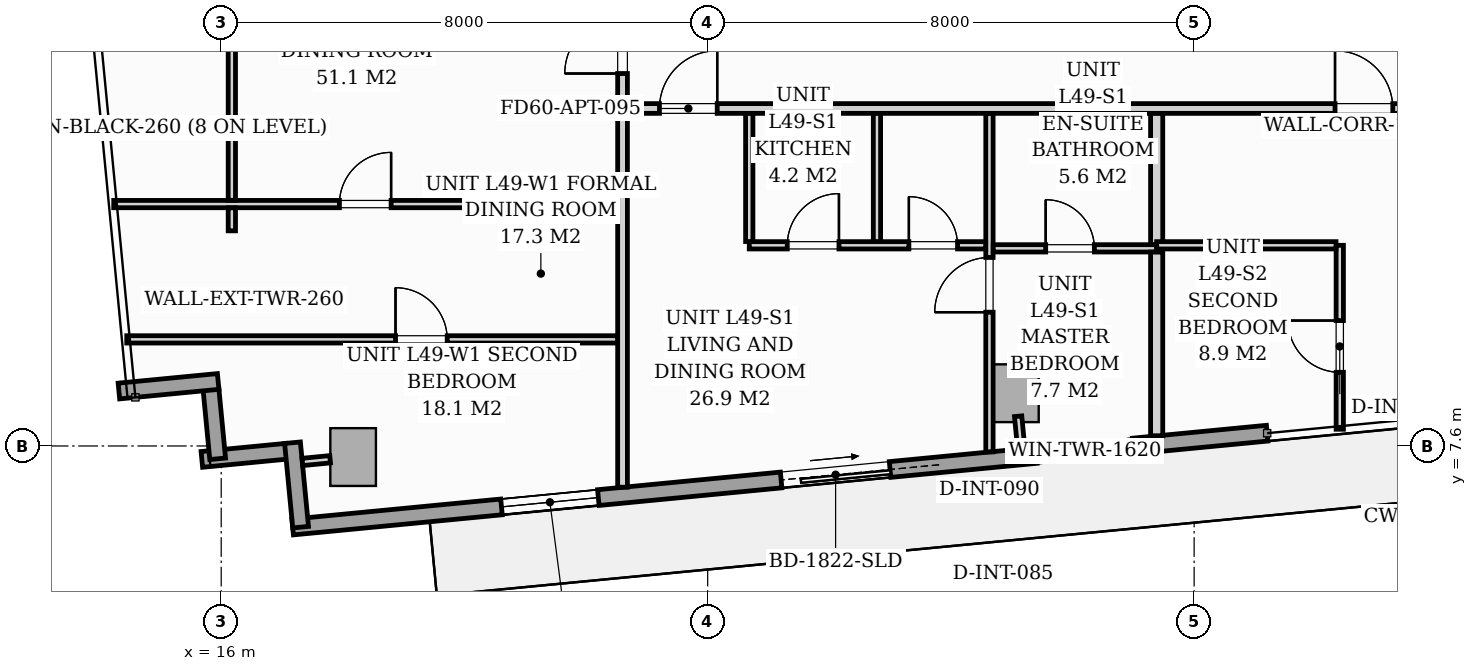
"""IFC4 building model, lengths in metres.
Left out: names, types, materials, properties, quantities, classifications, styles, units other than length and angle.
Written with IfcOpenShell. Run it as: python <this file> out.ifc"""

import sys

from ifc_helpers import new_model, si_unit, direction, frame, frame_2d, origin, origin_2d, place, context, subcontext, project, spatial, rectangle, extrude, source, transform, mapped, element, fill, save


model = new_model("IFC4")
c1 = context("Model", 3, precision=1e-05, world=origin(), true_north=direction((0.0, 1.0)))
c2 = subcontext(c1, "Body", "Model", "MODEL_VIEW")
j1 = project(units=[si_unit("LENGTHUNIT", "METRE"), si_unit("PLANEANGLEUNIT", "RADIAN")], contexts=[c1])
p1 = place(None, origin())
s1 = spatial("IfcSite", under=j1, at=p1, CompositionType="ELEMENT")
p2 = place(p1, origin())
s2 = spatial("IfcBuilding", under=s1, at=p2, CompositionType="ELEMENT")
p3 = place(p2, frame((0.0, 0.0, 173.0)))
s3 = spatial("IfcBuildingStorey", under=s2, at=p3, CompositionType="ELEMENT", Elevation=173.0)
m1 = source(origin(), c2, "Body", "SweptSolid", [
    extrude(rectangle(XDim=0.75, YDim=0.95, at=origin_2d()), origin(), (0.0, 0.0, 1.0), 3.196),
])
for number, where, z_axis, x_axis in (
    (1, (18.169, 7.418, 0.002), (0.0, 0.0, 1.0), (0.995, 0.096, 0.0)),
    (2, (29.069, 8.467, 0.002), (0.0, 0.0, 1.0), (0.995, 0.096, 0.0)),
):
    element("IfcColumn", number, at=place(p3, frame(where, z_axis=z_axis, x_axis=x_axis)), inside=s3, PredefinedType="COLUMN", context=c2, shape_type="MappedRepresentation", body=[
        mapped(m1, transform((0.0, 0.0, 0.0), scale=1.0)),
    ])
p4 = place(p3, frame((17.07, 7.513, 0.0), z_axis=(0.0, 0.0, 1.0), x_axis=(-0.995391056452, -0.09589913835, 0.0)))
e3 = element("IfcWall", 3, at=p4, inside=s3, PredefinedType="STANDARD", context=c2, shape_type="SweptSolid", body=[
    extrude(rectangle(XDim=1.395, YDim=0.26, at=frame_2d((0.698, 0.0))), origin(), (0.0, 0.0, 1.0), 2.94),
])
p5 = place(p3, frame((15.942, 7.389, 0.0), z_axis=(0.0, 0.0, 1.0), x_axis=(-0.09576095695, 0.995404359607, 0.0)))
e4 = element("IfcWall", 4, at=p5, inside=s3, PredefinedType="STANDARD", context=c2, shape_type="SweptSolid", body=[
    extrude(rectangle(XDim=1.15, YDim=0.26, at=frame_2d((0.575, 0.0))), origin(), (0.0, 0.0, 1.0), 2.94),
])
p6 = place(p3, frame((15.95, 8.661, 0.0), z_axis=(0.0, 0.0, 1.0), x_axis=(-0.995394563142, -0.095862733462, 0.0)))
e5 = element("IfcWall", 5, at=p6, inside=s3, PredefinedType="STANDARD", context=c2, shape_type="SweptSolid", body=[
    extrude(rectangle(XDim=1.64, YDim=0.26, at=frame_2d((0.82, 0.0))), origin(), (0.0, 0.0, 1.0), 2.94),
])
p7 = place(p3, frame((33.201, 7.81, 0.0), z_axis=(0.0, 0.0, 1.0), x_axis=(-0.995397074604, -0.095836652014, 0.0)))
e6 = element("IfcWall", 6, at=p7, inside=s3, PredefinedType="STANDARD", context=c2, shape_type="SweptSolid", body=[
    extrude(rectangle(XDim=16.1, YDim=0.26, at=frame_2d((8.05, 0.0))), origin(), (0.0, 0.0, 1.0), 2.94),
])
p8 = place(p7, frame((6.23, 0.0, 0.0)))
e7 = element("IfcOpeningElement", 7, at=p8, cuts=e6, PredefinedType="OPENING", context=c2, shape_type="SweptSolid", body=[
    extrude(rectangle(XDim=1.8, YDim=2.06, at=frame_2d((0.9, 1.03))), frame((0.0, 0.14, 0.0), z_axis=(0.0, -1.0, 0.0), x_axis=(1.0, 0.0, 0.0)), (0.0, 0.0, 1.0), 0.28),
])
p9 = place(p7, frame((11.05, 0.0, 0.65)))
e8 = element("IfcOpeningElement", 8, at=p9, cuts=e6, PredefinedType="OPENING", context=c2, shape_type="SweptSolid", body=[
    extrude(rectangle(XDim=1.6, YDim=1.5, at=frame_2d((0.8, 0.75))), frame((0.0, 0.14, 0.0), z_axis=(0.0, -1.0, 0.0), x_axis=(1.0, 0.0, 0.0)), (0.0, 0.0, 1.0), 0.28),
])
p10 = place(p7, frame((2.213, 0.0, 0.75)))
e9 = element("IfcOpeningElement", 9, at=p10, cuts=e6, PredefinedType="OPENING", context=c2, shape_type="SweptSolid", body=[
    extrude(rectangle(XDim=1.6, YDim=1.5, at=frame_2d((0.8, 0.75))), frame((0.0, 0.14, 0.0), z_axis=(0.0, -1.0, 0.0), x_axis=(1.0, 0.0, 0.0)), (0.0, 0.0, 1.0), 0.28),
])
p11 = place(p3, frame((17.306, 6.265, 0.0), z_axis=(0.0, 0.0, 1.0), x_axis=(-0.095915846097, 0.995389446633, 0.0)))
e10 = element("IfcWall", 10, at=p11, inside=s3, PredefinedType="STANDARD", context=c2, shape_type="SweptSolid", body=[
    extrude(rectangle(XDim=1.395, YDim=0.26, at=frame_2d((0.697, 0.0))), origin(), (0.0, 0.0, 1.0), 2.94),
])
p12 = place(p3, frame((22.6, 13.15, 0.0), z_axis=(0.0, 0.0, 1.0), x_axis=(1.0, 0.0, 0.0)))
e11 = element("IfcWall", 11, at=p12, inside=s3, PredefinedType="PARTITIONING", context=c2, shape_type="SweptSolid", body=[
    extrude(rectangle(XDim=23.28, YDim=0.16, at=frame_2d((11.64, 0.0))), origin(), (0.0, 0.0, 1.0), 2.94),
])
p13 = place(p12, frame((0.607, 0.0, 0.0)))
e12 = element("IfcOpeningElement", 12, at=p13, cuts=e11, PredefinedType="OPENING", context=c2, shape_type="SweptSolid", body=[
    extrude(rectangle(XDim=0.95, YDim=2.06, at=frame_2d((0.475, 1.03))), frame((0.0, 0.09, 0.0), z_axis=(0.0, -1.0, 0.0), x_axis=(1.0, 0.0, 0.0)), (0.0, 0.0, 1.0), 0.18),
])
p14 = place(p12, frame((11.717, 0.0, 0.0)))
e13 = element("IfcOpeningElement", 13, at=p14, cuts=e11, PredefinedType="OPENING", context=c2, shape_type="SweptSolid", body=[
    extrude(rectangle(XDim=0.95, YDim=2.06, at=frame_2d((0.475, 1.03))), frame((0.0, 0.09, 0.0), z_axis=(0.0, -1.0, 0.0), x_axis=(1.0, 0.0, 0.0)), (0.0, 0.0, 1.0), 0.18),
])
p15 = place(p3, frame((22.6, 6.922, 0.0), z_axis=(0.0, 0.0, 1.0), x_axis=(0.0, 1.0, 0.0)))
e14 = element("IfcWall", 14, at=p15, inside=s3, PredefinedType="PARTITIONING", context=c2, shape_type="SweptSolid", body=[
    extrude(rectangle(XDim=6.146, YDim=0.16, at=frame_2d((3.073, 0.0))), origin(), (0.0, 0.0, 1.0), 2.94),
])
p16 = place(p3, frame((22.6, 13.232, 0.0), z_axis=(0.0, 0.0, 1.0), x_axis=(0.0, 1.0, 0.0)))
e15 = element("IfcWall", 15, at=p16, inside=s3, PredefinedType="PARTITIONING", context=c2, shape_type="SweptSolid", body=[
    extrude(rectangle(XDim=11.649, YDim=0.16, at=frame_2d((5.824, 0.0))), origin(), (0.0, 0.0, 1.0), 2.94),
])
p17 = place(p16, frame((0.493, 0.0, 0.0)))
e16 = element("IfcOpeningElement", 16, at=p17, cuts=e15, PredefinedType="OPENING", context=c2, shape_type="SweptSolid", body=[
    extrude(rectangle(XDim=0.95, YDim=2.06, at=frame_2d((0.475, 1.03))), frame((0.0, 0.09, 0.0), z_axis=(0.0, -1.0, 0.0), x_axis=(1.0, 0.0, 0.0)), (0.0, 0.0, 1.0), 0.18),
])
p18 = place(p3, frame((28.634, 7.503, 0.0), z_axis=(0.0, 0.0, 1.0), x_axis=(0.0, 1.0, 0.0)))
e17 = element("IfcWall", 17, at=p18, inside=s3, PredefinedType="PARTITIONING", context=c2, shape_type="SweptSolid", body=[
    extrude(rectangle(XDim=5.565, YDim=0.12, at=frame_2d((2.782, 0.0))), origin(), (0.0, 0.0, 1.0), 2.94),
])
p19 = place(p18, frame((2.297, 0.0, 0.0)))
e18 = element("IfcOpeningElement", 18, at=p19, cuts=e17, PredefinedType="OPENING", context=c2, shape_type="SweptSolid", body=[
    extrude(rectangle(XDim=0.9, YDim=2.05, at=frame_2d((0.45, 1.025))), frame((0.0, 0.07, 0.0), z_axis=(0.0, -1.0, 0.0), x_axis=(1.0, 0.0, 0.0)), (0.0, 0.0, 1.0), 0.14),
])
p20 = place(p3, frame((24.684, 10.9, 0.0), z_axis=(0.0, 0.0, 1.0), x_axis=(1.0, 0.0, 0.0)))
e19 = element("IfcWall", 19, at=p20, inside=s3, PredefinedType="PARTITIONING", context=c2, shape_type="SweptSolid", body=[
    extrude(rectangle(XDim=3.888, YDim=0.12, at=frame_2d((1.944, 0.0))), origin(), (0.0, 0.0, 1.0), 2.94),
])
p21 = place(p20, frame((0.625, 0.0, 0.0)))
e20 = element("IfcOpeningElement", 20, at=p21, cuts=e19, PredefinedType="OPENING", context=c2, shape_type="SweptSolid", body=[
    extrude(rectangle(XDim=0.85, YDim=2.05, at=frame_2d((0.425, 1.025))), frame((0.0, 0.07, 0.0), z_axis=(0.0, -1.0, 0.0), x_axis=(1.0, 0.0, 0.0)), (0.0, 0.0, 1.0), 0.14),
])
p22 = place(p20, frame((2.625, 0.0, 0.0)))
e21 = element("IfcOpeningElement", 21, at=p22, cuts=e19, PredefinedType="OPENING", context=c2, shape_type="SweptSolid", body=[
    extrude(rectangle(XDim=0.8, YDim=2.02, at=frame_2d((0.4, 1.01))), frame((0.0, 0.07, 0.0), z_axis=(0.0, -1.0, 0.0), x_axis=(1.0, 0.0, 0.0)), (0.0, 0.0, 1.0), 0.14),
])
for number, where, z_axis, x_axis in (
    (22, (26.784, 10.962, 0.0), (0.0, 0.0, 1.0), (0.0, 1.0, 0.0)),
    (23, (24.684, 10.962, 0.0), (0.0, 0.0, 1.0), (0.0, 1.0, 0.0)),
):
    element("IfcWall", number, at=place(p3, frame(where, z_axis=z_axis, x_axis=x_axis)), inside=s3, PredefinedType="PARTITIONING", context=c2, shape_type="SweptSolid", body=[
        extrude(rectangle(XDim=2.106, YDim=0.12, at=frame_2d((1.053, 0.0))), origin(), (0.0, 0.0, 1.0), 2.94),
    ])
p23 = place(p3, frame((28.696, 10.85, 0.0), z_axis=(0.0, 0.0, 1.0), x_axis=(1.0, 0.0, 0.0)))
e24 = element("IfcWall", 24, at=p23, inside=s3, PredefinedType="PARTITIONING", context=c2, shape_type="SweptSolid", body=[
    extrude(rectangle(XDim=2.688, YDim=0.12, at=frame_2d((1.344, 0.0))), origin(), (0.0, 0.0, 1.0), 2.94),
])
p24 = place(p23, frame((0.863, 0.0, 0.0)))
e25 = element("IfcOpeningElement", 25, at=p24, cuts=e24, PredefinedType="OPENING", context=c2, shape_type="SweptSolid", body=[
    extrude(rectangle(XDim=0.8, YDim=2.02, at=frame_2d((0.4, 1.01))), frame((0.0, 0.07, 0.0), z_axis=(0.0, -1.0, 0.0), x_axis=(1.0, 0.0, 0.0)), (0.0, 0.0, 1.0), 0.14),
])
p25 = place(p3, frame((31.384, 7.768, 0.0), z_axis=(0.0, 0.0, 1.0), x_axis=(0.0, 1.0, 0.0)))
e26 = element("IfcWall", 26, at=p25, inside=s3, PredefinedType="PARTITIONING", context=c2, shape_type="SweptSolid", body=[
    extrude(rectangle(XDim=3.02, YDim=0.2, at=frame_2d((1.51, 0.0))), origin(), (0.0, 0.0, 1.0), 2.94),
])
p26 = place(p3, frame((31.384, 10.912, 0.0), z_axis=(0.0, 0.0, 1.0), x_axis=(0.0, 1.0, 0.0)))
e27 = element("IfcWall", 27, at=p26, inside=s3, PredefinedType="PARTITIONING", context=c2, shape_type="SweptSolid", body=[
    extrude(rectangle(XDim=2.156, YDim=0.2, at=frame_2d((1.078, 0.0))), origin(), (0.0, 0.0, 1.0), 2.94),
])
p27 = place(p3, frame((34.395, 7.875, 0.0), z_axis=(0.0, 0.0, 1.0), x_axis=(0.0, 1.0, 0.0)))
e28 = element("IfcWall", 28, at=p27, inside=s3, PredefinedType="PARTITIONING", context=c2, shape_type="SweptSolid", body=[
    extrude(rectangle(XDim=3.025, YDim=0.12, at=frame_2d((1.512, 0.0))), origin(), (0.0, 0.0, 1.0), 2.94),
])
p28 = place(p27, frame((0.937, 0.0, 0.0)))
e29 = element("IfcOpeningElement", 29, at=p28, cuts=e28, PredefinedType="OPENING", context=c2, shape_type="SweptSolid", body=[
    extrude(rectangle(XDim=0.85, YDim=2.05, at=frame_2d((0.425, 1.025))), frame((0.0, 0.07, 0.0), z_axis=(0.0, -1.0, 0.0), x_axis=(1.0, 0.0, 0.0)), (0.0, 0.0, 1.0), 0.14),
])
p29 = place(p3, frame((31.384, 10.9, 0.0), z_axis=(0.0, 0.0, 1.0), x_axis=(1.0, 0.0, 0.0)))
e30 = element("IfcWall", 30, at=p29, inside=s3, PredefinedType="PARTITIONING", context=c2, shape_type="SweptSolid", body=[
    extrude(rectangle(XDim=2.949, YDim=0.12, at=frame_2d((1.475, 0.0))), origin(), (0.0, 0.0, 1.0), 2.94),
])
p30 = place(p3, frame((14.447, 9.353, 0.0), z_axis=(0.0, 0.0, 1.0), x_axis=(1.0, 0.0, 0.0)))
e31 = element("IfcWall", 31, at=p30, inside=s3, PredefinedType="PARTITIONING", context=c2, shape_type="SweptSolid", body=[
    extrude(rectangle(XDim=8.071, YDim=0.12, at=frame_2d((4.036, 0.0))), origin(), (0.0, 0.0, 1.0), 2.94),
])
p31 = place(p30, frame((4.42, 0.0, 0.0)))
e32 = element("IfcOpeningElement", 32, at=p31, cuts=e31, PredefinedType="OPENING", context=c2, shape_type="SweptSolid", body=[
    extrude(rectangle(XDim=0.85, YDim=2.05, at=frame_2d((0.425, 1.025))), frame((0.0, 0.07, 0.0), z_axis=(0.0, -1.0, 0.0), x_axis=(1.0, 0.0, 0.0)), (0.0, 0.0, 1.0), 0.14),
])
p32 = place(p3, frame((14.233, 11.578, 0.0), z_axis=(0.0, 0.0, 1.0), x_axis=(1.0, 0.0, 0.0)))
e33 = element("IfcWall", 33, at=p32, inside=s3, PredefinedType="PARTITIONING", context=c2, shape_type="SweptSolid", body=[
    extrude(rectangle(XDim=8.285, YDim=0.12, at=frame_2d((4.143, 0.0))), origin(), (0.0, 0.0, 1.0), 2.94),
])
p33 = place(p32, frame((3.711, 0.0, 0.0)))
e34 = element("IfcOpeningElement", 34, at=p33, cuts=e33, PredefinedType="OPENING", context=c2, shape_type="SweptSolid", body=[
    extrude(rectangle(XDim=0.85, YDim=2.05, at=frame_2d((0.425, 1.025))), frame((0.0, 0.07, 0.0), z_axis=(0.0, -1.0, 0.0), x_axis=(1.0, 0.0, 0.0)), (0.0, 0.0, 1.0), 0.14),
])
p34 = place(p3, frame((16.175, 11.138, 0.0), z_axis=(0.0, 0.0, 1.0), x_axis=(0.0, 1.0, 0.0)))
e35 = element("IfcWall", 35, at=p34, inside=s3, PredefinedType="PARTITIONING", context=c2, shape_type="SweptSolid", body=[
    extrude(rectangle(XDim=0.378, YDim=0.12, at=frame_2d((0.189, 0.0))), origin(), (0.0, 0.0, 1.0), 2.94),
])
p35 = place(p3, frame((16.175, 11.64, 0.0), z_axis=(0.0, 0.0, 1.0), x_axis=(0.0, 1.0, 0.0)))
e36 = element("IfcWall", 36, at=p35, inside=s3, PredefinedType="PARTITIONING", context=c2, shape_type="SweptSolid", body=[
    extrude(rectangle(XDim=9.824, YDim=0.12, at=frame_2d((4.912, 0.0))), origin(), (0.0, 0.0, 1.0), 2.383),
])
p36 = place(p35, frame((4.487, 0.0, 0.0)))
e37 = element("IfcOpeningElement", 37, at=p36, cuts=e36, PredefinedType="OPENING", context=c2, shape_type="SweptSolid", body=[
    extrude(rectangle(XDim=0.85, YDim=2.05, at=frame_2d((0.425, 1.025))), frame((0.0, 0.07, 0.0), z_axis=(0.0, -1.0, 0.0), x_axis=(1.0, 0.0, 0.0)), (0.0, 0.0, 1.0), 0.14),
])
p37 = place(p3, frame((17.791, 7.382, 0.0), z_axis=(0.0, 0.0, 1.0), x_axis=(-0.995384576284, -0.09596637586, 0.0)))
e38 = element("IfcWall", 38, at=p37, inside=s3, PredefinedType="PARTITIONING", context=c2, shape_type="SweptSolid", body=[
    extrude(rectangle(XDim=0.458, YDim=0.12, at=frame_2d((0.229, 0.0))), origin(), (0.0, 0.0, 1.0), 2.94),
])
p38 = place(p3, frame((29.105, 8.089, 0.0), z_axis=(0.0, 0.0, 1.0), x_axis=(0.095772948675, -0.995403205893, 0.0)))
e39 = element("IfcWall", 39, at=p38, inside=s3, PredefinedType="PARTITIONING", context=c2, shape_type="SweptSolid", body=[
    extrude(rectangle(XDim=0.538, YDim=0.12, at=frame_2d((0.269, 0.0))), origin(), (0.0, 0.0, 1.0), 2.94),
])
m2 = source(origin(), c2, "Body", "SweptSolid", [
    extrude(rectangle(XDim=1.8, YDim=2.06, at=frame_2d((0.9, 1.03))), frame((0.0, 0.025, 0.0), z_axis=(0.0, -1.0, 0.0), x_axis=(1.0, 0.0, 0.0)), (0.0, 0.0, 1.0), 0.05),
])
p39 = place(p8, origin())
e40 = element("IfcDoor", 40, at=p39, inside=s3, OperationType="SLIDING_TO_LEFT", PredefinedType="DOOR", context=c2, shape_type="MappedRepresentation", body=[
    mapped(m2, transform((0.0, 0.0, 0.0), scale=1.0)),
])
fill(e7, e40)
m3 = source(origin(), c2, "Body", "SweptSolid", [
    extrude(rectangle(XDim=1.6, YDim=1.5, at=frame_2d((0.8, 0.75))), frame((0.0, 0.03, 0.0), z_axis=(0.0, -1.0, 0.0), x_axis=(1.0, 0.0, 0.0)), (0.0, 0.0, 1.0), 0.06),
])
p40 = place(p9, origin())
e41 = element("IfcWindow", 41, at=p40, inside=s3, PartitioningType="SINGLE_PANEL", PredefinedType="WINDOW", context=c2, shape_type="MappedRepresentation", body=[
    mapped(m3, transform((0.0, 0.0, 0.0), scale=1.0)),
])
fill(e8, e41)
p41 = place(p10, origin())
e42 = element("IfcWindow", 42, at=p41, inside=s3, PartitioningType="SINGLE_PANEL", PredefinedType="WINDOW", context=c2, shape_type="MappedRepresentation", body=[
    mapped(m3, transform((0.0, 0.0, 0.0), scale=1.0)),
])
fill(e9, e42)
m4 = source(origin(), c2, "Body", "SweptSolid", [
    extrude(rectangle(XDim=0.8, YDim=2.02, at=frame_2d((0.4, 1.01))), frame((0.0, 0.025, 0.0), z_axis=(0.0, -1.0, 0.0), x_axis=(1.0, 0.0, 0.0)), (0.0, 0.0, 1.0), 0.05),
])
p42 = place(p24, origin())
e43 = element("IfcDoor", 43, at=p42, inside=s3, OperationType="SINGLE_SWING_LEFT", PredefinedType="DOOR", context=c2, shape_type="MappedRepresentation", body=[
    mapped(m4, transform((0.0, 0.0, 0.0), scale=1.0)),
])
fill(e25, e43)
m5 = source(origin(), c2, "Body", "SweptSolid", [
    extrude(rectangle(XDim=0.95, YDim=2.06, at=frame_2d((0.475, 1.03))), frame((0.0, 0.025, 0.0), z_axis=(0.0, -1.0, 0.0), x_axis=(1.0, 0.0, 0.0)), (0.0, 0.0, 1.0), 0.05),
])
p43 = place(p13, origin())
e44 = element("IfcDoor", 44, at=p43, inside=s3, OperationType="SINGLE_SWING_RIGHT", PredefinedType="DOOR", context=c2, shape_type="MappedRepresentation", body=[
    mapped(m5, transform((0.0, 0.0, 0.0), scale=1.0)),
])
fill(e12, e44)
m6 = source(origin(), c2, "Body", "SweptSolid", [
    extrude(rectangle(XDim=0.9, YDim=2.05, at=frame_2d((0.45, 1.025))), frame((0.0, 0.025, 0.0), z_axis=(0.0, -1.0, 0.0), x_axis=(1.0, 0.0, 0.0)), (0.0, 0.0, 1.0), 0.05),
])
p44 = place(p19, origin())
e45 = element("IfcDoor", 45, at=p44, inside=s3, OperationType="SINGLE_SWING_LEFT", PredefinedType="DOOR", context=c2, shape_type="MappedRepresentation", body=[
    mapped(m6, transform((0.0, 0.0, 0.0), scale=1.0)),
])
fill(e18, e45)
m7 = source(origin(), c2, "Body", "SweptSolid", [
    extrude(rectangle(XDim=0.85, YDim=2.05, at=frame_2d((0.425, 1.025))), frame((0.0, 0.025, 0.0), z_axis=(0.0, -1.0, 0.0), x_axis=(1.0, 0.0, 0.0)), (0.0, 0.0, 1.0), 0.05),
])
p45 = place(p21, origin())
e46 = element("IfcDoor", 46, at=p45, inside=s3, OperationType="SINGLE_SWING_RIGHT", PredefinedType="DOOR", context=c2, shape_type="MappedRepresentation", body=[
    mapped(m7, transform((0.0, 0.0, 0.0), scale=1.0)),
])
fill(e20, e46)
p46 = place(p22, origin())
e47 = element("IfcDoor", 47, at=p46, inside=s3, OperationType="SINGLE_SWING_LEFT", PredefinedType="DOOR", context=c2, shape_type="MappedRepresentation", body=[
    mapped(m4, transform((0.0, 0.0, 0.0), scale=1.0)),
])
fill(e21, e47)
p47 = place(p28, origin())
e48 = element("IfcDoor", 48, at=p47, inside=s3, OperationType="SINGLE_SWING_RIGHT", PredefinedType="DOOR", context=c2, shape_type="MappedRepresentation", body=[
    mapped(m7, transform((0.0, 0.0, 0.0), scale=1.0)),
])
fill(e29, e48)
p48 = place(p14, origin())
e49 = element("IfcDoor", 49, at=p48, inside=s3, OperationType="SINGLE_SWING_LEFT", PredefinedType="DOOR", context=c2, shape_type="MappedRepresentation", body=[
    mapped(m5, transform((0.0, 0.0, 0.0), scale=1.0)),
])
fill(e13, e49)
p49 = place(p17, origin())
e50 = element("IfcDoor", 50, at=p49, inside=s3, OperationType="SINGLE_SWING_LEFT", PredefinedType="DOOR", context=c2, shape_type="MappedRepresentation", body=[
    mapped(m5, transform((0.0, 0.0, 0.0), scale=1.0)),
])
fill(e16, e50)
p50 = place(p31, origin())
e51 = element("IfcDoor", 51, at=p50, inside=s3, OperationType="SINGLE_SWING_LEFT", PredefinedType="DOOR", context=c2, shape_type="MappedRepresentation", body=[
    mapped(m7, transform((0.0, 0.0, 0.0), scale=1.0)),
])
fill(e32, e51)
p51 = place(p33, origin())
e52 = element("IfcDoor", 52, at=p51, inside=s3, OperationType="SINGLE_SWING_RIGHT", PredefinedType="DOOR", context=c2, shape_type="MappedRepresentation", body=[
    mapped(m7, transform((0.0, 0.0, 0.0), scale=1.0)),
])
fill(e34, e52)
save(model, sys.argv[1])
